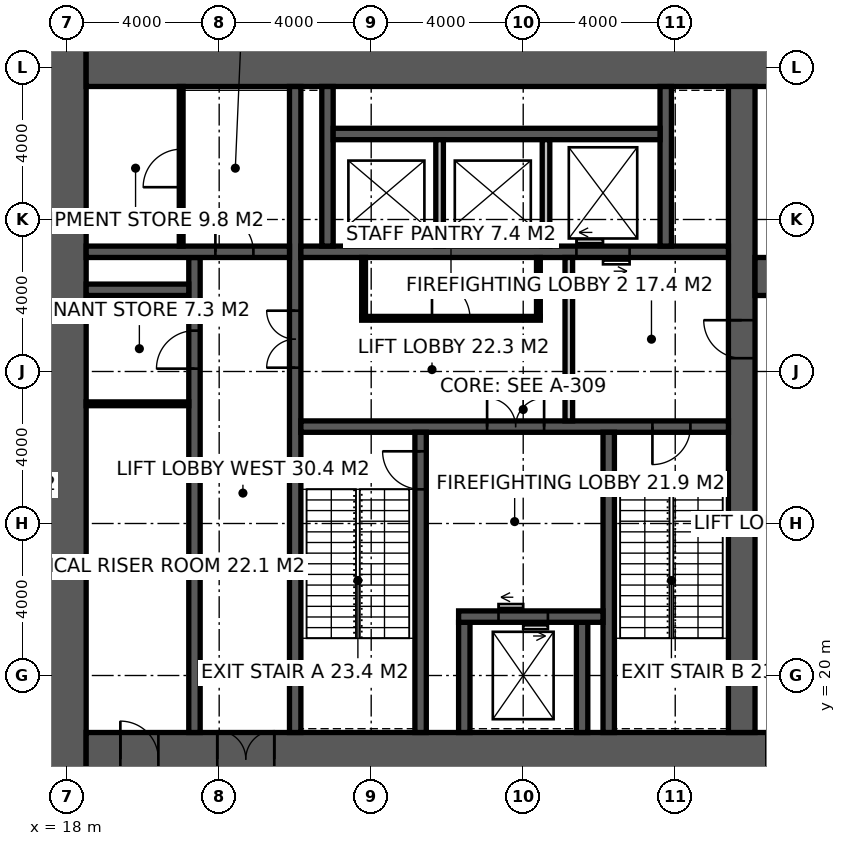
"""IFC4 building model, lengths in metres.
Left out: names, types, materials, properties, quantities, classifications, styles, units other than length and angle.
Written with IfcOpenShell. Run it as: python <this file> out.ifc"""

import sys

from ifc_helpers import new_model, si_unit, direction, frame, frame_2d, origin, place, context, subcontext, project, spatial, rectangle, extrude, element, fill, save


model = new_model("IFC4")
c1 = context("Model", 3, precision=1e-05, world=origin(), true_north=direction((0.0, 1.0)))
c2 = subcontext(c1, "Body", "Model", "MODEL_VIEW")
j1 = project(units=[si_unit("LENGTHUNIT", "METRE"), si_unit("PLANEANGLEUNIT", "RADIAN")], contexts=[c1])
p1 = place(None, origin())
s1 = spatial("IfcSite", under=j1, at=p1, CompositionType="ELEMENT")
p2 = place(p1, origin())
s2 = spatial("IfcBuilding", under=s1, at=p2, CompositionType="ELEMENT")
p3 = place(p2, frame((0.0, 0.0, 6.0)))
s3 = spatial("IfcBuildingStorey", under=s2, at=p3, CompositionType="ELEMENT", Elevation=6.0)
p4 = place(p3, frame((18.0, 17.1, -0.15), z_axis=(0.0, 0.0, 1.0), x_axis=(0.0, 1.0, 0.0)))
e1 = element("IfcWall", 1, at=p4, inside=s3, PredefinedType="SHEAR", context=c2, shape_type="SweptSolid", body=[
    extrude(rectangle(XDim=19.8, YDim=1.0, at=frame_2d((9.9, 0.0))), origin(), (0.0, 0.0, 1.0), 5.0),
])
p5 = place(p3, frame((18.5, 17.8, -0.15), z_axis=(0.0, 0.0, 1.0), x_axis=(1.0, 0.0, 0.0)))
e2 = element("IfcWall", 2, at=p5, inside=s3, PredefinedType="SHEAR", context=c2, shape_type="SweptSolid", body=[
    extrude(rectangle(XDim=23.0, YDim=1.4, at=frame_2d((11.5, 0.0))), origin(), (0.0, 0.0, 1.0), 5.0),
])
p6 = place(p5, frame((3.45, 0.0, 0.15)))
e3 = element("IfcOpeningElement", 3, at=p6, cuts=e2, PredefinedType="OPENING", context=c2, shape_type="SweptSolid", body=[
    extrude(rectangle(XDim=1.5, YDim=2.4, at=frame_2d((0.75, 1.2))), frame((0.0, 0.71, 0.0), z_axis=(0.0, -1.0, 0.0), x_axis=(1.0, 0.0, 0.0)), (0.0, 0.0, 1.0), 1.42),
])
p7 = place(p5, frame((17.9, 0.0, 0.15)))
e4 = element("IfcOpeningElement", 4, at=p7, cuts=e2, PredefinedType="OPENING", context=c2, shape_type="SweptSolid", body=[
    extrude(rectangle(XDim=1.5, YDim=2.4, at=frame_2d((0.75, 1.2))), frame((0.0, 0.71, 0.0), z_axis=(0.0, -1.0, 0.0), x_axis=(1.0, 0.0, 0.0)), (0.0, 0.0, 1.0), 1.42),
])
p8 = place(p5, frame((0.9, 0.0, 0.15)))
e5 = element("IfcOpeningElement", 5, at=p8, cuts=e2, PredefinedType="OPENING", context=c2, shape_type="SweptSolid", body=[
    extrude(rectangle(XDim=1.0, YDim=2.2, at=frame_2d((0.5, 1.1))), frame((0.0, 0.71, 0.0), z_axis=(0.0, -1.0, 0.0), x_axis=(1.0, 0.0, 0.0)), (0.0, 0.0, 1.0), 1.42),
])
p9 = place(p3, frame((18.5, 36.2, -0.15), z_axis=(0.0, 0.0, 1.0), x_axis=(1.0, 0.0, 0.0)))
e6 = element("IfcWall", 6, at=p9, inside=s3, PredefinedType="SHEAR", context=c2, shape_type="SweptSolid", body=[
    extrude(rectangle(XDim=23.0, YDim=1.4, at=frame_2d((11.5, 0.0))), origin(), (0.0, 0.0, 1.0), 5.0),
])
p10 = place(p3, frame((35.75, 18.5, -0.15), z_axis=(0.0, 0.0, 1.0), x_axis=(0.0, 1.0, 0.0)))
e7 = element("IfcWall", 7, at=p10, inside=s3, PredefinedType="SHEAR", context=c2, shape_type="SweptSolid", body=[
    extrude(rectangle(XDim=17.0, YDim=0.7, at=frame_2d((8.5, 0.0))), origin(), (0.0, 0.0, 1.0), 5.0),
])
p11 = place(p10, frame((9.85, 0.0, 0.15)))
e8 = element("IfcOpeningElement", 8, at=p11, cuts=e7, PredefinedType="OPENING", context=c2, shape_type="SweptSolid", body=[
    extrude(rectangle(XDim=1.0, YDim=2.2, at=frame_2d((0.5, 1.1))), frame((0.0, 0.36, 0.0), z_axis=(0.0, -1.0, 0.0), x_axis=(1.0, 0.0, 0.0)), (0.0, 0.0, 1.0), 0.72),
])
p12 = place(p3, frame((24.0, 18.5, -0.15), z_axis=(0.0, 0.0, 1.0), x_axis=(0.0, 1.0, 0.0)))
e9 = element("IfcWall", 9, at=p12, inside=s3, PredefinedType="SHEAR", context=c2, shape_type="SweptSolid", body=[
    extrude(rectangle(XDim=17.0, YDim=0.3, at=frame_2d((8.5, 0.0))), origin(), (0.0, 0.0, 1.0), 5.0),
])
p13 = place(p12, frame((9.6, 0.0, 0.15)))
e10 = element("IfcOpeningElement", 10, at=p13, cuts=e9, PredefinedType="OPENING", context=c2, shape_type="SweptSolid", body=[
    extrude(rectangle(XDim=1.5, YDim=2.4, at=frame_2d((0.75, 1.2))), frame((0.0, 0.16, 0.0), z_axis=(0.0, -1.0, 0.0), x_axis=(1.0, 0.0, 0.0)), (0.0, 0.0, 1.0), 0.32),
])
p14 = place(p3, frame((24.15, 26.55, -0.15), z_axis=(0.0, 0.0, 1.0), x_axis=(1.0, 0.0, 0.0)))
e11 = element("IfcWall", 11, at=p14, inside=s3, PredefinedType="SHEAR", context=c2, shape_type="SweptSolid", body=[
    extrude(rectangle(XDim=11.25, YDim=0.3, at=frame_2d((5.625, 0.0))), origin(), (0.0, 0.0, 1.0), 5.0),
])
p15 = place(p14, frame((9.25, 0.0, 0.15)))
e12 = element("IfcOpeningElement", 12, at=p15, cuts=e11, PredefinedType="OPENING", context=c2, shape_type="SweptSolid", body=[
    extrude(rectangle(XDim=1.0, YDim=2.2, at=frame_2d((0.5, 1.1))), frame((0.0, 0.16, 0.0), z_axis=(0.0, -1.0, 0.0), x_axis=(1.0, 0.0, 0.0)), (0.0, 0.0, 1.0), 0.32),
])
p16 = place(p14, frame((4.9, 0.0, 0.15)))
e13 = element("IfcOpeningElement", 13, at=p16, cuts=e11, PredefinedType="OPENING", context=c2, shape_type="SweptSolid", body=[
    extrude(rectangle(XDim=1.5, YDim=2.4, at=frame_2d((0.75, 1.2))), frame((0.0, 0.16, 0.0), z_axis=(0.0, -1.0, 0.0), x_axis=(1.0, 0.0, 0.0)), (0.0, 0.0, 1.0), 0.32),
])
p17 = place(p3, frame((27.3, 18.5, -0.15), z_axis=(0.0, 0.0, 1.0), x_axis=(0.0, 1.0, 0.0)))
e14 = element("IfcWall", 14, at=p17, inside=s3, PredefinedType="SHEAR", context=c2, shape_type="SweptSolid", body=[
    extrude(rectangle(XDim=7.9, YDim=0.3, at=frame_2d((3.95, 0.0))), origin(), (0.0, 0.0, 1.0), 5.0),
])
p18 = place(p17, frame((6.4, 0.0, 0.15)))
e15 = element("IfcOpeningElement", 15, at=p18, cuts=e14, PredefinedType="OPENING", context=c2, shape_type="SweptSolid", body=[
    extrude(rectangle(XDim=1.0, YDim=2.2, at=frame_2d((0.5, 1.1))), frame((0.0, 0.16, 0.0), z_axis=(0.0, -1.0, 0.0), x_axis=(1.0, 0.0, 0.0)), (0.0, 0.0, 1.0), 0.32),
])
p19 = place(p3, frame((32.25, 18.5, -0.15), z_axis=(0.0, 0.0, 1.0), x_axis=(0.0, 1.0, 0.0)))
e16 = element("IfcWall", 16, at=p19, inside=s3, PredefinedType="SHEAR", context=c2, shape_type="SweptSolid", body=[
    extrude(rectangle(XDim=7.9, YDim=0.3, at=frame_2d((3.95, 0.0))), origin(), (0.0, 0.0, 1.0), 5.0),
])
for number, where, z_axis, x_axis in (
    (17, (28.45, 18.5, -0.15), (0.0, 0.0, 1.0), (0.0, 1.0, 0.0)),
    (18, (31.55, 18.5, -0.15), (0.0, 0.0, 1.0), (0.0, 1.0, 0.0)),
):
    element("IfcWall", number, at=place(p3, frame(where, z_axis=z_axis, x_axis=x_axis)), inside=s3, PredefinedType="SHEAR", context=c2, shape_type="SweptSolid", body=[
        extrude(rectangle(XDim=2.9, YDim=0.3, at=frame_2d((1.45, 0.0))), origin(), (0.0, 0.0, 1.0), 5.0),
    ])
p20 = place(p3, frame((28.3, 21.55, -0.15), z_axis=(0.0, 0.0, 1.0), x_axis=(1.0, 0.0, 0.0)))
e19 = element("IfcWall", 19, at=p20, inside=s3, PredefinedType="SHEAR", context=c2, shape_type="SweptSolid", body=[
    extrude(rectangle(XDim=3.8, YDim=0.3, at=frame_2d((1.9, 0.0))), origin(), (0.0, 0.0, 1.0), 5.0),
])
p21 = place(p20, frame((1.05, 0.0, 0.15)))
e20 = element("IfcOpeningElement", 20, at=p21, cuts=e19, PredefinedType="OPENING", context=c2, shape_type="SweptSolid", body=[
    extrude(rectangle(XDim=1.3, YDim=2.4, at=frame_2d((0.65, 1.2))), frame((0.0, 0.16, 0.0), z_axis=(0.0, -1.0, 0.0), x_axis=(1.0, 0.0, 0.0)), (0.0, 0.0, 1.0), 0.32),
])
p22 = place(p3, frame((24.15, 31.15, -0.15), z_axis=(0.0, 0.0, 1.0), x_axis=(1.0, 0.0, 0.0)))
e21 = element("IfcWall", 21, at=p22, inside=s3, PredefinedType="SHEAR", context=c2, shape_type="SweptSolid", body=[
    extrude(rectangle(XDim=11.25, YDim=0.3, at=frame_2d((5.625, 0.0))), origin(), (0.0, 0.0, 1.0), 5.0),
])
p23 = place(p22, frame((7.25, 0.0, 0.15)))
e22 = element("IfcOpeningElement", 22, at=p23, cuts=e21, PredefinedType="OPENING", context=c2, shape_type="SweptSolid", body=[
    extrude(rectangle(XDim=1.4, YDim=2.4, at=frame_2d((0.7, 1.2))), frame((0.0, 0.16, 0.0), z_axis=(0.0, -1.0, 0.0), x_axis=(1.0, 0.0, 0.0)), (0.0, 0.0, 1.0), 0.32),
])
p24 = place(p3, frame((21.35, 18.5, -0.15), z_axis=(0.0, 0.0, 1.0), x_axis=(0.0, 1.0, 0.0)))
e23 = element("IfcWall", 23, at=p24, inside=s3, PredefinedType="SHEAR", context=c2, shape_type="SweptSolid", body=[
    extrude(rectangle(XDim=12.5, YDim=0.3, at=frame_2d((6.25, 0.0))), origin(), (0.0, 0.0, 1.0), 5.0),
])
p25 = place(p24, frame((9.575, 0.0, 0.15)))
e24 = element("IfcOpeningElement", 24, at=p25, cuts=e23, PredefinedType="OPENING", context=c2, shape_type="SweptSolid", body=[
    extrude(rectangle(XDim=1.0, YDim=2.2, at=frame_2d((0.5, 1.1))), frame((0.0, 0.16, 0.0), z_axis=(0.0, -1.0, 0.0), x_axis=(1.0, 0.0, 0.0)), (0.0, 0.0, 1.0), 0.32),
])
p26 = place(p3, frame((18.5, 31.15, -0.15), z_axis=(0.0, 0.0, 1.0), x_axis=(1.0, 0.0, 0.0)))
e25 = element("IfcWall", 25, at=p26, inside=s3, PredefinedType="SHEAR", context=c2, shape_type="SweptSolid", body=[
    extrude(rectangle(XDim=5.35, YDim=0.3, at=frame_2d((2.675, 0.0))), origin(), (0.0, 0.0, 1.0), 5.0),
])
p27 = place(p26, frame((3.4, 0.0, 0.15)))
e26 = element("IfcOpeningElement", 26, at=p27, cuts=e25, PredefinedType="OPENING", context=c2, shape_type="SweptSolid", body=[
    extrude(rectangle(XDim=1.0, YDim=2.2, at=frame_2d((0.5, 1.1))), frame((0.0, 0.16, 0.0), z_axis=(0.0, -1.0, 0.0), x_axis=(1.0, 0.0, 0.0)), (0.0, 0.0, 1.0), 0.32),
])
p28 = place(p3, frame((18.5, 30.15, -0.15), z_axis=(0.0, 0.0, 1.0), x_axis=(1.0, 0.0, 0.0)))
e27 = element("IfcWall", 27, at=p28, inside=s3, PredefinedType="SHEAR", context=c2, shape_type="SweptSolid", body=[
    extrude(rectangle(XDim=2.7, YDim=0.3, at=frame_2d((1.35, 0.0))), origin(), (0.0, 0.0, 1.0), 5.0),
])
for number, where, z_axis, x_axis in (
    (28, (24.85, 31.3, -0.15), (0.0, 0.0, 1.0), (0.0, 1.0, 0.0)),
    (29, (33.75, 31.3, -0.15), (0.0, 0.0, 1.0), (0.0, 1.0, 0.0)),
):
    element("IfcWall", number, at=place(p3, frame(where, z_axis=z_axis, x_axis=x_axis)), inside=s3, PredefinedType="SHEAR", context=c2, shape_type="SweptSolid", body=[
        extrude(rectangle(XDim=4.2, YDim=0.3, at=frame_2d((2.1, 0.0))), origin(), (0.0, 0.0, 1.0), 5.0),
    ])
p29 = place(p3, frame((25.0, 34.25, -0.15), z_axis=(0.0, 0.0, 1.0), x_axis=(1.0, 0.0, 0.0)))
e30 = element("IfcWall", 30, at=p29, inside=s3, PredefinedType="SHEAR", context=c2, shape_type="SweptSolid", body=[
    extrude(rectangle(XDim=8.6, YDim=0.3, at=frame_2d((4.3, 0.0))), origin(), (0.0, 0.0, 1.0), 5.0),
])
for number, where, z_axis, x_axis in (
    (31, (27.8, 31.3, -0.15), (0.0, 0.0, 1.0), (0.0, 1.0, 0.0)),
    (32, (30.6, 31.3, -0.15), (0.0, 0.0, 1.0), (0.0, 1.0, 0.0)),
):
    element("IfcWall", number, at=place(p3, frame(where, z_axis=z_axis, x_axis=x_axis)), inside=s3, PredefinedType="SOLIDWALL", context=c2, shape_type="SweptSolid", body=[
        extrude(rectangle(XDim=2.8, YDim=0.2, at=frame_2d((1.4, 0.0))), origin(), (0.0, 0.0, 1.0), 5.0),
    ])
p30 = place(p3, frame((36.1, 30.5, -0.15), z_axis=(0.0, 0.0, 1.0), x_axis=(1.0, 0.0, 0.0)))
e33 = element("IfcWall", 33, at=p30, inside=s3, PredefinedType="SHEAR", context=c2, shape_type="SweptSolid", body=[
    extrude(rectangle(XDim=5.4, YDim=1.0, at=frame_2d((2.7, 0.0))), origin(), (0.0, 0.0, 1.0), 5.0),
])
p31 = place(p30, frame((0.6, 0.0, 0.15)))
e34 = element("IfcOpeningElement", 34, at=p31, cuts=e33, PredefinedType="OPENING", context=c2, shape_type="SweptSolid", body=[
    extrude(rectangle(XDim=1.0, YDim=2.2, at=frame_2d((0.5, 1.1))), frame((0.0, 0.51, 0.0), z_axis=(0.0, -1.0, 0.0), x_axis=(1.0, 0.0, 0.0)), (0.0, 0.0, 1.0), 1.02),
])
p32 = place(p3, frame((31.2, 26.7, 0.0), z_axis=(0.0, 0.0, 1.0), x_axis=(0.0, 1.0, 0.0)))
e35 = element("IfcWall", 35, at=p32, inside=s3, PredefinedType="SOLIDWALL", context=c2, shape_type="SweptSolid", body=[
    extrude(rectangle(XDim=4.3, YDim=0.2, at=frame_2d((2.15, 0.0))), origin(), (0.0, 0.0, 1.0), 4.85),
])
p33 = place(p3, frame((21.0, 31.3, 0.0), z_axis=(0.0, 0.0, 1.0), x_axis=(0.0, 1.0, 0.0)))
e36 = element("IfcWall", 36, at=p33, inside=s3, PredefinedType="PARTITIONING", context=c2, shape_type="SweptSolid", body=[
    extrude(rectangle(XDim=4.2, YDim=0.1, at=frame_2d((2.1, 0.0))), origin(), (0.0, 0.0, 1.0), 4.85),
])
p34 = place(p33, frame((1.55, 0.0, 0.0)))
e37 = element("IfcOpeningElement", 37, at=p34, cuts=e36, PredefinedType="OPENING", context=c2, shape_type="SweptSolid", body=[
    extrude(rectangle(XDim=1.0, YDim=2.2, at=frame_2d((0.5, 1.1))), frame((0.0, 0.06, 0.0), z_axis=(0.0, -1.0, 0.0), x_axis=(1.0, 0.0, 0.0)), (0.0, 0.0, 1.0), 0.12),
])
p35 = place(p3, frame((25.75, 29.4, 0.0), z_axis=(0.0, 0.0, 1.0), x_axis=(1.0, 0.0, 0.0)))
e38 = element("IfcWall", 38, at=p35, inside=s3, PredefinedType="PARTITIONING", context=c2, shape_type="SweptSolid", body=[
    extrude(rectangle(XDim=4.7, YDim=0.1, at=frame_2d((2.35, 0.0))), origin(), (0.0, 0.0, 1.0), 4.85),
])
p36 = place(p35, frame((1.85, 0.0, 0.0)))
e39 = element("IfcOpeningElement", 39, at=p36, cuts=e38, PredefinedType="OPENING", context=c2, shape_type="SweptSolid", body=[
    extrude(rectangle(XDim=1.0, YDim=2.2, at=frame_2d((0.5, 1.1))), frame((0.0, 0.06, 0.0), z_axis=(0.0, -1.0, 0.0), x_axis=(1.0, 0.0, 0.0)), (0.0, 0.0, 1.0), 0.12),
])
for number, where, z_axis, x_axis in (
    (40, (25.8, 29.45, 0.0), (0.0, 0.0, 1.0), (0.0, 1.0, 0.0)),
    (41, (30.4, 29.45, 0.0), (0.0, 0.0, 1.0), (0.0, 1.0, 0.0)),
):
    element("IfcWall", number, at=place(p3, frame(where, z_axis=z_axis, x_axis=x_axis)), inside=s3, PredefinedType="PARTITIONING", context=c2, shape_type="SweptSolid", body=[
        extrude(rectangle(XDim=1.55, YDim=0.1, at=frame_2d((0.775, 0.0))), origin(), (0.0, 0.0, 1.0), 4.85),
    ])
p37 = place(p3, frame((18.5, 27.15, 0.0), z_axis=(0.0, 0.0, 1.0), x_axis=(1.0, 0.0, 0.0)))
e42 = element("IfcWall", 42, at=p37, inside=s3, PredefinedType="PARTITIONING", context=c2, shape_type="SweptSolid", body=[
    extrude(rectangle(XDim=2.7, YDim=0.1, at=frame_2d((1.35, 0.0))), origin(), (0.0, 0.0, 1.0), 4.85),
])
p38 = place(p18, origin())
e43 = element("IfcDoor", 43, at=p38, inside=s3, OperationType="SINGLE_SWING_RIGHT", PredefinedType="DOOR", context=c2, shape_type="SweptSolid", body=[
    extrude(rectangle(XDim=1.0, YDim=2.2, at=frame_2d((0.5, 1.1))), frame((0.0, 0.025, 0.0), z_axis=(0.0, -1.0, 0.0), x_axis=(1.0, 0.0, 0.0)), (0.0, 0.0, 1.0), 0.05),
])
fill(e15, e43)
p39 = place(p15, frame((1.0, 0.0, 0.0), z_axis=(0.0, 0.0, 1.0), x_axis=(-1.0, 0.0, 0.0)))
e44 = element("IfcDoor", 44, at=p39, inside=s3, OperationType="SINGLE_SWING_RIGHT", PredefinedType="DOOR", context=c2, shape_type="SweptSolid", body=[
    extrude(rectangle(XDim=1.0, YDim=2.2, at=frame_2d((0.5, 1.1))), frame((0.0, 0.025, 0.0), z_axis=(0.0, -1.0, 0.0), x_axis=(1.0, 0.0, 0.0)), (0.0, 0.0, 1.0), 0.05),
])
fill(e12, e44)
p40 = place(p11, origin())
e45 = element("IfcDoor", 45, at=p40, inside=s3, OperationType="SINGLE_SWING_RIGHT", PredefinedType="DOOR", context=c2, shape_type="SweptSolid", body=[
    extrude(rectangle(XDim=1.0, YDim=2.2, at=frame_2d((0.5, 1.1))), frame((0.0, 0.025, 0.0), z_axis=(0.0, -1.0, 0.0), x_axis=(1.0, 0.0, 0.0)), (0.0, 0.0, 1.0), 0.05),
])
fill(e8, e45)
p41 = place(p16, origin())
e46 = element("IfcDoor", 46, at=p41, inside=s3, OperationType="DOUBLE_DOOR_DOUBLE_SWING", PredefinedType="DOOR", context=c2, shape_type="SweptSolid", body=[
    extrude(rectangle(XDim=1.5, YDim=2.4, at=frame_2d((0.75, 1.2))), frame((0.0, 0.025, 0.0), z_axis=(0.0, -1.0, 0.0), x_axis=(1.0, 0.0, 0.0)), (0.0, 0.0, 1.0), 0.05),
])
fill(e13, e46)
p42 = place(p13, origin())
e47 = element("IfcDoor", 47, at=p42, inside=s3, OperationType="DOUBLE_DOOR_DOUBLE_SWING", PredefinedType="DOOR", context=c2, shape_type="SweptSolid", body=[
    extrude(rectangle(XDim=1.5, YDim=2.4, at=frame_2d((0.75, 1.2))), frame((0.0, 0.025, 0.0), z_axis=(0.0, -1.0, 0.0), x_axis=(1.0, 0.0, 0.0)), (0.0, 0.0, 1.0), 0.05),
])
fill(e10, e47)
p43 = place(p27, origin())
e48 = element("IfcDoor", 48, at=p43, inside=s3, OperationType="SINGLE_SWING_LEFT", PredefinedType="DOOR", context=c2, shape_type="SweptSolid", body=[
    extrude(rectangle(XDim=1.0, YDim=2.2, at=frame_2d((0.5, 1.1))), frame((0.0, 0.025, 0.0), z_axis=(0.0, -1.0, 0.0), x_axis=(1.0, 0.0, 0.0)), (0.0, 0.0, 1.0), 0.05),
])
fill(e26, e48)
p44 = place(p34, origin())
e49 = element("IfcDoor", 49, at=p44, inside=s3, OperationType="SINGLE_SWING_LEFT", PredefinedType="DOOR", context=c2, shape_type="SweptSolid", body=[
    extrude(rectangle(XDim=1.0, YDim=2.2, at=frame_2d((0.5, 1.1))), frame((0.0, 0.025, 0.0), z_axis=(0.0, -1.0, 0.0), x_axis=(1.0, 0.0, 0.0)), (0.0, 0.0, 1.0), 0.05),
])
fill(e37, e49)
p45 = place(p36, origin())
e50 = element("IfcDoor", 50, at=p45, inside=s3, OperationType="SINGLE_SWING_LEFT", PredefinedType="DOOR", context=c2, shape_type="SweptSolid", body=[
    extrude(rectangle(XDim=1.0, YDim=2.2, at=frame_2d((0.5, 1.1))), frame((0.0, 0.025, 0.0), z_axis=(0.0, -1.0, 0.0), x_axis=(1.0, 0.0, 0.0)), (0.0, 0.0, 1.0), 0.05),
])
fill(e39, e50)
p46 = place(p25, origin())
e51 = element("IfcDoor", 51, at=p46, inside=s3, OperationType="SINGLE_SWING_LEFT", PredefinedType="DOOR", context=c2, shape_type="SweptSolid", body=[
    extrude(rectangle(XDim=1.0, YDim=2.2, at=frame_2d((0.5, 1.1))), frame((0.0, 0.025, 0.0), z_axis=(0.0, -1.0, 0.0), x_axis=(1.0, 0.0, 0.0)), (0.0, 0.0, 1.0), 0.05),
])
fill(e24, e51)
p47 = place(p6, origin())
e52 = element("IfcDoor", 52, at=p47, inside=s3, OperationType="DOUBLE_DOOR_DOUBLE_SWING", PredefinedType="DOOR", context=c2, shape_type="SweptSolid", body=[
    extrude(rectangle(XDim=1.5, YDim=2.4, at=frame_2d((0.75, 1.2))), frame((0.0, 0.025, 0.0), z_axis=(0.0, -1.0, 0.0), x_axis=(1.0, 0.0, 0.0)), (0.0, 0.0, 1.0), 0.05),
])
fill(e3, e52)
p48 = place(p8, origin())
e53 = element("IfcDoor", 53, at=p48, inside=s3, OperationType="SINGLE_SWING_LEFT", PredefinedType="DOOR", context=c2, shape_type="SweptSolid", body=[
    extrude(rectangle(XDim=1.0, YDim=2.2, at=frame_2d((0.5, 1.1))), frame((0.0, 0.025, 0.0), z_axis=(0.0, -1.0, 0.0), x_axis=(1.0, 0.0, 0.0)), (0.0, 0.0, 1.0), 0.05),
])
fill(e5, e53)
p49 = place(p21, origin())
e54 = element("IfcDoor", 54, at=p49, inside=s3, OperationType="DOUBLE_DOOR_SLIDING", PredefinedType="DOOR", context=c2, shape_type="SweptSolid", body=[
    extrude(rectangle(XDim=1.3, YDim=2.4, at=frame_2d((0.65, 1.2))), frame((0.0, 0.025, 0.0), z_axis=(0.0, -1.0, 0.0), x_axis=(1.0, 0.0, 0.0)), (0.0, 0.0, 1.0), 0.05),
])
fill(e20, e54)
p50 = place(p23, origin())
e55 = element("IfcDoor", 55, at=p50, inside=s3, OperationType="DOUBLE_DOOR_SLIDING", PredefinedType="DOOR", context=c2, shape_type="SweptSolid", body=[
    extrude(rectangle(XDim=1.4, YDim=2.4, at=frame_2d((0.7, 1.2))), frame((0.0, 0.025, 0.0), z_axis=(0.0, -1.0, 0.0), x_axis=(1.0, 0.0, 0.0)), (0.0, 0.0, 1.0), 0.05),
])
fill(e22, e55)
save(model, sys.argv[1])
